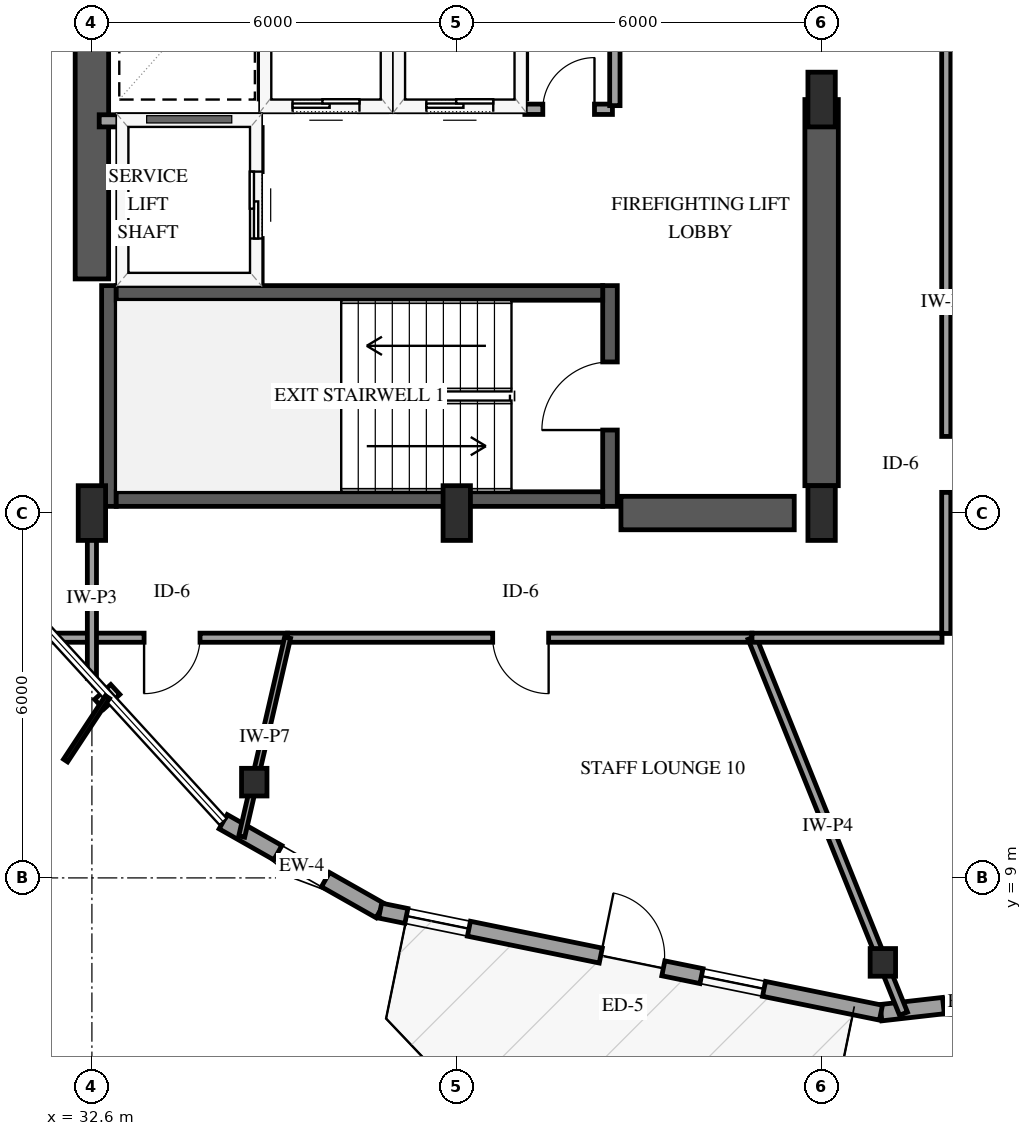
"""IFC4 building model, lengths in metres.
Left out: names, types, materials, properties, quantities, classifications, styles, units other than length and angle.
Written with IfcOpenShell. Run it as: python <this file> out.ifc"""

import sys

from ifc_helpers import new_model, si_unit, direction, frame, frame_2d, origin, origin_2d, place, context, subcontext, project, spatial, rectangle, i_section, extrude, element, fill, save


model = new_model("IFC4")
c1 = context("Model", 3, precision=1e-05, world=origin(), true_north=direction((0.0, 1.0)))
c2 = subcontext(c1, "Body", "Model", "MODEL_VIEW")
j1 = project(units=[si_unit("LENGTHUNIT", "METRE"), si_unit("PLANEANGLEUNIT", "RADIAN")], contexts=[c1])
p1 = place(None, origin())
s1 = spatial("IfcSite", under=j1, at=p1, CompositionType="ELEMENT")
p2 = place(p1, origin())
s2 = spatial("IfcBuilding", under=s1, at=p2, CompositionType="ELEMENT")
p3 = place(p2, frame((0.0, 0.0, 122.5)))
s3 = spatial("IfcBuildingStorey", under=s2, at=p3, CompositionType="ELEMENT", Elevation=122.5)
p4 = place(p3, frame((32.88, 15.11, 0.0), z_axis=(0.0, 0.0, 1.0), x_axis=(0.0, 1.0, 0.0)))
e1 = element("IfcWall", 1, at=p4, inside=s3, PredefinedType="SHEAR", context=c2, shape_type="SweptSolid", body=[
    extrude(rectangle(XDim=3.63, YDim=0.24, at=frame_2d((1.815, 0.0))), origin(), (0.0, 0.0, 1.0), 3.9),
])
p5 = place(p3, frame((41.12, 15.11, 0.0), z_axis=(0.0, 0.0, 1.0), x_axis=(0.0, 1.0, 0.0)))
e2 = element("IfcWall", 2, at=p5, inside=s3, PredefinedType="SHEAR", context=c2, shape_type="SweptSolid", body=[
    extrude(rectangle(XDim=3.63, YDim=0.24, at=frame_2d((1.815, 0.0))), origin(), (0.0, 0.0, 1.0), 3.9),
])
p6 = place(p5, frame((1.255, 0.0, 0.0)))
e3 = element("IfcOpeningElement", 3, at=p6, cuts=e2, PredefinedType="OPENING", context=c2, shape_type="SweptSolid", body=[
    extrude(rectangle(XDim=1.12, YDim=2.15, at=frame_2d((0.56, 1.075))), frame((0.0, 0.13, 0.0), z_axis=(0.0, -1.0, 0.0), x_axis=(1.0, 0.0, 0.0)), (0.0, 0.0, 1.0), 0.26),
])
for number, where, z_axis, x_axis in (
    (4, (33.0, 15.23, 0.0), (0.0, 0.0, 1.0), (1.0, 0.0, 0.0)),
    (5, (33.0, 18.62, 0.0), (0.0, 0.0, 1.0), (1.0, 0.0, 0.0)),
):
    element("IfcWall", number, at=place(p3, frame(where, z_axis=z_axis, x_axis=x_axis)), inside=s3, PredefinedType="SHEAR", context=c2, shape_type="SweptSolid", body=[
        extrude(rectangle(XDim=8.0, YDim=0.24, at=frame_2d((4.0, 0.0))), origin(), (0.0, 0.0, 1.0), 3.9),
    ])
p7 = place(p3, frame((32.6, 18.85, 0.0), z_axis=(0.0, 0.0, 1.0), x_axis=(0.0, 1.0, 0.0)))
e6 = element("IfcWall", 6, at=p7, inside=s3, PredefinedType="SHEAR", context=c2, shape_type="SweptSolid", body=[
    extrude(rectangle(XDim=12.3, YDim=0.55, at=frame_2d((6.15, 0.0))), origin(), (0.0, 0.0, 1.0), 3.9),
])
p8 = place(p3, frame((41.3, 15.0, 0.0), z_axis=(0.0, 0.0, 1.0), x_axis=(1.0, 0.0, 0.0)))
e7 = element("IfcWall", 7, at=p8, inside=s3, PredefinedType="SHEAR", context=c2, shape_type="SweptSolid", body=[
    extrude(rectangle(XDim=2.85, YDim=0.55, at=frame_2d((1.425, 0.0))), origin(), (0.0, 0.0, 1.0), 3.9),
])
p9 = place(p3, frame((44.6, 15.45, 0.0), z_axis=(0.0, 0.0, 1.0), x_axis=(0.0, 1.0, 0.0)))
e8 = element("IfcWall", 8, at=p9, inside=s3, PredefinedType="SHEAR", context=c2, shape_type="SweptSolid", body=[
    extrude(rectangle(XDim=6.35, YDim=0.55, at=frame_2d((3.175, 0.0))), origin(), (0.0, 0.0, 1.0), 3.9),
])
for number, where, z_axis, x_axis in (
    (9, (32.6, 15.0, 0.0), (0.0, 0.0, 1.0), (1.0, 0.0, 0.0)),
    (10, (38.6, 15.0, 0.0), (0.0, 0.0, 1.0), (1.0, 0.0, 0.0)),
    (11, (44.6, 15.0, 0.0), (0.0, 0.0, 1.0), (1.0, 0.0, 0.0)),
    (12, (44.6, 21.8, 0.0), (0.0, 0.0, 1.0), (1.0, 0.0, 0.0)),
):
    element("IfcColumn", number, at=place(p3, frame(where, z_axis=z_axis, x_axis=x_axis)), inside=s3, PredefinedType="PILASTER", context=c2, shape_type="SweptSolid", body=[
        extrude(rectangle(XDim=0.45, YDim=0.9, at=origin_2d()), origin(), (0.0, 0.0, 1.0), 3.9),
    ])
for number, where, z_axis, x_axis in (
    (13, (35.27, 10.575, 0.0), (0.0, 0.0, 1.0), (1.0, 0.0, 0.0)),
    (14, (45.607, 7.611, 0.0), (0.0, 0.0, 1.0), (1.0, 0.0, 0.0)),
):
    element("IfcColumn", number, at=place(p3, frame(where, z_axis=z_axis, x_axis=x_axis)), inside=s3, PredefinedType="COLUMN", context=c2, shape_type="SweptSolid", body=[
        extrude(i_section(OverallWidth=0.418, OverallDepth=0.455, WebThickness=0.042, FlangeThickness=0.068, FilletRadius=0.038, at=origin_2d()), origin(), (0.0, 0.0, 1.0), 3.9),
    ])
p10 = place(p3, frame((34.759, 9.924, 0.0), z_axis=(0.0, 0.0, 1.0), x_axis=(0.870196274844, -0.492705229572, 0.0)))
e15 = element("IfcWall", 15, at=p10, inside=s3, PredefinedType="SOLIDWALL", context=c2, shape_type="SweptSolid", body=[
    extrude(rectangle(XDim=2.967, YDim=0.27, at=frame_2d((1.483, 0.0))), origin(), (0.0, 0.0, 1.0), 2.979),
])
p11 = place(p10, frame((1.033, 0.0, 0.75)))
e16 = element("IfcOpeningElement", 16, at=p11, cuts=e15, PredefinedType="OPENING", context=c2, shape_type="SweptSolid", body=[
    extrude(rectangle(XDim=0.9, YDim=1.5, at=frame_2d((0.45, 0.75))), frame((0.0, 0.145, 0.0), z_axis=(0.0, -1.0, 0.0), x_axis=(1.0, 0.0, 0.0)), (0.0, 0.0, 1.0), 0.29),
])
p12 = place(p3, frame((45.576, 6.783, 0.0), z_axis=(0.0, 0.0, 1.0), x_axis=(0.993605674431, 0.11290599514, 0.0)))
e17 = element("IfcWall", 17, at=p12, inside=s3, PredefinedType="SOLIDWALL", context=c2, shape_type="SweptSolid", body=[
    extrude(rectangle(XDim=2.967, YDim=0.27, at=frame_2d((1.483, 0.0))), origin(), (0.0, 0.0, 1.0), 2.979),
])
p13 = place(p12, frame((1.033, 0.0, 0.75)))
e18 = element("IfcOpeningElement", 18, at=p13, cuts=e17, PredefinedType="OPENING", context=c2, shape_type="SweptSolid", body=[
    extrude(rectangle(XDim=0.9, YDim=1.5, at=frame_2d((0.45, 0.75))), frame((0.0, 0.145, 0.0), z_axis=(0.0, -1.0, 0.0), x_axis=(1.0, 0.0, 0.0)), (0.0, 0.0, 1.0), 0.29),
])
p14 = place(p3, frame((37.34, 8.462, 0.0), z_axis=(0.0, 0.0, 1.0), x_axis=(0.979852344118, -0.199723267865, 0.0)))
e19 = element("IfcWall", 19, at=p14, inside=s3, PredefinedType="SOLIDWALL", context=c2, shape_type="SweptSolid", body=[
    extrude(rectangle(XDim=8.405, YDim=0.25, at=frame_2d((4.203, 0.0))), origin(), (0.0, 0.0, 1.0), 2.979),
])
p15 = place(p14, frame((3.703, 0.0, 0.0)))
e20 = element("IfcOpeningElement", 20, at=p15, cuts=e19, PredefinedType="OPENING", context=c2, shape_type="SweptSolid", body=[
    extrude(rectangle(XDim=1.05, YDim=2.15, at=frame_2d((0.525, 1.075))), frame((0.0, 0.135, 0.0), z_axis=(0.0, -1.0, 0.0), x_axis=(1.0, 0.0, 0.0)), (0.0, 0.0, 1.0), 0.27),
])
p16 = place(p14, frame((0.44, 0.0, 0.72)))
e21 = element("IfcOpeningElement", 21, at=p16, cuts=e19, PredefinedType="OPENING", context=c2, shape_type="SweptSolid", body=[
    extrude(rectangle(XDim=1.05, YDim=1.55, at=frame_2d((0.525, 0.775))), frame((0.0, 0.135, 0.0), z_axis=(0.0, -1.0, 0.0), x_axis=(1.0, 0.0, 0.0)), (0.0, 0.0, 1.0), 0.27),
])
p17 = place(p14, frame((5.393, 0.0, 0.72)))
e22 = element("IfcOpeningElement", 22, at=p17, cuts=e19, PredefinedType="OPENING", context=c2, shape_type="SweptSolid", body=[
    extrude(rectangle(XDim=1.05, YDim=1.55, at=frame_2d((0.525, 0.775))), frame((0.0, 0.135, 0.0), z_axis=(0.0, -1.0, 0.0), x_axis=(1.0, 0.0, 0.0)), (0.0, 0.0, 1.0), 0.27),
])
p18 = place(p3, frame((35.45, 21.7, 0.0), z_axis=(0.0, 0.0, 1.0), x_axis=(1.0, 0.0, 0.0)))
e23 = element("IfcWall", 23, at=p18, inside=s3, PredefinedType="SOLIDWALL", context=c2, shape_type="SweptSolid", body=[
    extrude(rectangle(XDim=2.0, YDim=0.2, at=frame_2d((1.0, 0.0))), origin(), (0.0, 0.0, 1.0), 3.6),
])
p19 = place(p18, frame((0.45, 0.0, 0.0)))
e24 = element("IfcOpeningElement", 24, at=p19, cuts=e23, PredefinedType="OPENING", context=c2, shape_type="SweptSolid", body=[
    extrude(rectangle(XDim=1.1, YDim=2.15, at=frame_2d((0.55, 1.075))), frame((0.0, 0.11, 0.0), z_axis=(0.0, -1.0, 0.0), x_axis=(1.0, 0.0, 0.0)), (0.0, 0.0, 1.0), 0.22),
])
for number, where, z_axis, x_axis in (
    (25, (35.45, 21.81, 0.0), (0.0, 0.0, 1.0), (0.0, 1.0, 0.0)),
    (26, (37.45, 21.81, 0.0), (0.0, 0.0, 1.0), (0.0, 1.0, 0.0)),
):
    element("IfcWall", number, at=place(p3, frame(where, z_axis=z_axis, x_axis=x_axis)), inside=s3, PredefinedType="SOLIDWALL", context=c2, shape_type="SweptSolid", body=[
        extrude(rectangle(XDim=2.38, YDim=0.2, at=frame_2d((1.19, 0.0))), origin(), (0.0, 0.0, 1.0), 3.6),
    ])
p20 = place(p3, frame((37.65, 21.7, 0.0), z_axis=(0.0, 0.0, 1.0), x_axis=(1.0, 0.0, 0.0)))
e27 = element("IfcWall", 27, at=p20, inside=s3, PredefinedType="SOLIDWALL", context=c2, shape_type="SweptSolid", body=[
    extrude(rectangle(XDim=2.0, YDim=0.2, at=frame_2d((1.0, 0.0))), origin(), (0.0, 0.0, 1.0), 3.6),
])
p21 = place(p20, frame((0.45, 0.0, 0.0)))
e28 = element("IfcOpeningElement", 28, at=p21, cuts=e27, PredefinedType="OPENING", context=c2, shape_type="SweptSolid", body=[
    extrude(rectangle(XDim=1.1, YDim=2.15, at=frame_2d((0.55, 1.075))), frame((0.0, 0.11, 0.0), z_axis=(0.0, -1.0, 0.0), x_axis=(1.0, 0.0, 0.0)), (0.0, 0.0, 1.0), 0.22),
])
p22 = place(p3, frame((39.65, 21.81, 0.0), z_axis=(0.0, 0.0, 1.0), x_axis=(0.0, 1.0, 0.0)))
e29 = element("IfcWall", 29, at=p22, inside=s3, PredefinedType="SOLIDWALL", context=c2, shape_type="SweptSolid", body=[
    extrude(rectangle(XDim=2.38, YDim=0.2, at=frame_2d((1.19, 0.0))), origin(), (0.0, 0.0, 1.0), 3.6),
])
p23 = place(p3, frame((32.72, 21.45, 0.0), z_axis=(0.0, 0.0, 1.0), x_axis=(1.0, 0.0, 0.0)))
e30 = element("IfcWall", 30, at=p23, inside=s3, PredefinedType="SOLIDWALL", context=c2, shape_type="SweptSolid", body=[
    extrude(rectangle(XDim=2.58, YDim=0.2, at=frame_2d((1.29, 0.0))), origin(), (0.0, 0.0, 1.0), 3.6),
])
p24 = place(p3, frame((35.3, 18.79, 0.0), z_axis=(0.0, 0.0, 1.0), x_axis=(0.0, 1.0, 0.0)))
e31 = element("IfcWall", 31, at=p24, inside=s3, PredefinedType="SOLIDWALL", context=c2, shape_type="SweptSolid", body=[
    extrude(rectangle(XDim=2.55, YDim=0.2, at=frame_2d((1.275, 0.0))), origin(), (0.0, 0.0, 1.0), 3.6),
])
p25 = place(p24, frame((0.725, 0.0, 0.0)))
e32 = element("IfcOpeningElement", 32, at=p25, cuts=e31, PredefinedType="OPENING", context=c2, shape_type="SweptSolid", body=[
    extrude(rectangle(XDim=1.1, YDim=2.15, at=frame_2d((0.55, 1.075))), frame((0.0, 0.11, 0.0), z_axis=(0.0, -1.0, 0.0), x_axis=(1.0, 0.0, 0.0)), (0.0, 0.0, 1.0), 0.22),
])
p26 = place(p3, frame((46.65, 18.55, 0.0), z_axis=(0.0, 0.0, 1.0), x_axis=(0.780401084776, -0.625279255118, 0.0)))
e33 = element("IfcWall", 33, at=p26, inside=s3, PredefinedType="PARTITIONING", context=c2, shape_type="SweptSolid", body=[
    extrude(rectangle(XDim=12.482, YDim=0.13, at=frame_2d((6.241, 0.0))), origin(), (0.0, 0.0, 1.0), 3.6),
])
p27 = place(p3, frame((43.455, 12.95, 0.0), z_axis=(0.0, 0.0, 1.0), x_axis=(-1.0, 0.0, 0.0)))
e34 = element("IfcWall", 34, at=p27, inside=s3, PredefinedType="PARTITIONING", context=c2, shape_type="SweptSolid", body=[
    extrude(rectangle(XDim=7.637, YDim=0.15, at=frame_2d((3.818, 0.0))), origin(), (0.0, 0.0, 1.0), 3.6),
])
p28 = place(p27, frame((3.344, 0.0, 0.0)))
e35 = element("IfcOpeningElement", 35, at=p28, cuts=e34, PredefinedType="OPENING", context=c2, shape_type="SweptSolid", body=[
    extrude(rectangle(XDim=0.92, YDim=2.12, at=frame_2d((0.46, 1.06))), frame((0.0, 0.085, 0.0), z_axis=(0.0, -1.0, 0.0), x_axis=(1.0, 0.0, 0.0)), (0.0, 0.0, 1.0), 0.17),
])
p29 = place(p3, frame((43.455, 12.95, 0.0), z_axis=(0.0, 0.0, 1.0), x_axis=(0.373820474629, -0.927501079648, 0.0)))
e36 = element("IfcWall", 36, at=p29, inside=s3, PredefinedType="PARTITIONING", context=c2, shape_type="SweptSolid", body=[
    extrude(rectangle(XDim=6.666, YDim=0.14, at=frame_2d((3.333, 0.0))), origin(), (0.0, 0.0, 1.0), 2.895),
])
p30 = place(p3, frame((46.65, 18.55, 0.0), z_axis=(0.0, 0.0, 1.0), x_axis=(0.0, -1.0, 0.0)))
e37 = element("IfcWall", 37, at=p30, inside=s3, PredefinedType="PARTITIONING", context=c2, shape_type="SweptSolid", body=[
    extrude(rectangle(XDim=5.53, YDim=0.15, at=frame_2d((2.765, 0.0))), origin(), (0.0, 0.0, 1.0), 3.6),
])
p31 = place(p30, frame((2.29, 0.0, 0.0)))
e38 = element("IfcOpeningElement", 38, at=p31, cuts=e37, PredefinedType="OPENING", context=c2, shape_type="SweptSolid", body=[
    extrude(rectangle(XDim=0.92, YDim=2.12, at=frame_2d((0.46, 1.06))), frame((0.0, 0.085, 0.0), z_axis=(0.0, -1.0, 0.0), x_axis=(1.0, 0.0, 0.0)), (0.0, 0.0, 1.0), 0.17),
])
p32 = place(p3, frame((46.65, 23.93, 0.0), z_axis=(0.0, 0.0, 1.0), x_axis=(0.0, -1.0, 0.0)))
e39 = element("IfcWall", 39, at=p32, inside=s3, PredefinedType="PARTITIONING", context=c2, shape_type="SweptSolid", body=[
    extrude(rectangle(XDim=5.38, YDim=0.15, at=frame_2d((2.69, 0.0))), origin(), (0.0, 0.0, 1.0), 3.6),
])
p33 = place(p3, frame((35.818, 12.95, 0.0), z_axis=(0.0, 0.0, 1.0), x_axis=(-1.0, 0.0, 0.0)))
e40 = element("IfcWall", 40, at=p33, inside=s3, PredefinedType="PARTITIONING", context=c2, shape_type="SweptSolid", body=[
    extrude(rectangle(XDim=3.83, YDim=0.15, at=frame_2d((1.915, 0.0))), origin(), (0.0, 0.0, 1.0), 3.6),
])
p34 = place(p33, frame((1.44, 0.0, 0.0)))
e41 = element("IfcOpeningElement", 41, at=p34, cuts=e40, PredefinedType="OPENING", context=c2, shape_type="SweptSolid", body=[
    extrude(rectangle(XDim=0.92, YDim=2.12, at=frame_2d((0.46, 1.06))), frame((0.0, 0.085, 0.0), z_axis=(0.0, -1.0, 0.0), x_axis=(1.0, 0.0, 0.0)), (0.0, 0.0, 1.0), 0.17),
])
p35 = place(p3, frame((35.818, 12.95, 0.0), z_axis=(0.0, 0.0, 1.0), x_axis=(-0.224790414322, -0.974407137509, 0.0)))
e42 = element("IfcWall", 42, at=p35, inside=s3, PredefinedType="PARTITIONING", context=c2, shape_type="SweptSolid", body=[
    extrude(rectangle(XDim=3.355, YDim=0.1, at=frame_2d((1.677, 0.0))), origin(), (0.0, 0.0, 1.0), 2.895),
])
p36 = place(p3, frame((46.58, 12.95, 0.0), z_axis=(0.0, 0.0, 1.0), x_axis=(-1.0, 0.0, 0.0)))
e43 = element("IfcWall", 43, at=p36, inside=s3, PredefinedType="PARTITIONING", context=c2, shape_type="SweptSolid", body=[
    extrude(rectangle(XDim=3.125, YDim=0.15, at=frame_2d((1.562, 0.0))), origin(), (0.0, 0.0, 1.0), 3.6),
])
p37 = place(p3, frame((32.6, 12.281, 0.0), z_axis=(0.0, 0.0, 1.0), x_axis=(0.0, 1.0, 0.0)))
e44 = element("IfcWall", 44, at=p37, inside=s3, PredefinedType="PARTITIONING", context=c2, shape_type="SweptSolid", body=[
    extrude(rectangle(XDim=2.649, YDim=0.15, at=frame_2d((1.324, 0.0))), origin(), (0.0, 0.0, 1.0), 3.6),
])
p38 = place(p3, frame((39.72, 21.64, 0.0), z_axis=(0.0, 0.0, 1.0), x_axis=(1.0, 0.0, 0.0)))
e45 = element("IfcWall", 45, at=p38, inside=s3, PredefinedType="PARTITIONING", context=c2, shape_type="SweptSolid", body=[
    extrude(rectangle(XDim=1.44, YDim=0.17, at=frame_2d((0.72, 0.0))), origin(), (0.0, 0.0, 1.0), 3.6),
])
p39 = place(p38, frame((0.295, 0.0, 0.0)))
e46 = element("IfcOpeningElement", 46, at=p39, cuts=e45, PredefinedType="OPENING", context=c2, shape_type="SweptSolid", body=[
    extrude(rectangle(XDim=0.85, YDim=2.1, at=frame_2d((0.425, 1.05))), frame((0.0, 0.095, 0.0), z_axis=(0.0, -1.0, 0.0), x_axis=(1.0, 0.0, 0.0)), (0.0, 0.0, 1.0), 0.19),
])
p40 = place(p3, frame((41.2, 21.7, 0.0), z_axis=(0.0, 0.0, 1.0), x_axis=(0.0, 1.0, 0.0)))
e47 = element("IfcWall", 47, at=p40, inside=s3, PredefinedType="PARTITIONING", context=c2, shape_type="SweptSolid", body=[
    extrude(rectangle(XDim=1.12, YDim=0.17, at=frame_2d((0.56, 0.0))), origin(), (0.0, 0.0, 1.0), 3.6),
])
p41 = place(p11, origin())
e48 = element("IfcWindow", 48, at=p41, inside=s3, PartitioningType="SINGLE_PANEL", PredefinedType="WINDOW", context=c2, shape_type="SweptSolid", body=[
    extrude(rectangle(XDim=0.9, YDim=1.5, at=frame_2d((0.45, 0.75))), frame((0.0, 0.03, 0.0), z_axis=(0.0, -1.0, 0.0), x_axis=(1.0, 0.0, 0.0)), (0.0, 0.0, 1.0), 0.06),
])
fill(e16, e48)
p42 = place(p13, origin())
e49 = element("IfcWindow", 49, at=p42, inside=s3, PartitioningType="SINGLE_PANEL", PredefinedType="WINDOW", context=c2, shape_type="SweptSolid", body=[
    extrude(rectangle(XDim=0.9, YDim=1.5, at=frame_2d((0.45, 0.75))), frame((0.0, 0.03, 0.0), z_axis=(0.0, -1.0, 0.0), x_axis=(1.0, 0.0, 0.0)), (0.0, 0.0, 1.0), 0.06),
])
fill(e18, e49)
p43 = place(p15, origin())
e50 = element("IfcDoor", 50, at=p43, inside=s3, OperationType="SINGLE_SWING_LEFT", PredefinedType="DOOR", context=c2, shape_type="SweptSolid", body=[
    extrude(rectangle(XDim=1.05, YDim=2.15, at=frame_2d((0.525, 1.075))), frame((0.0, 0.025, 0.0), z_axis=(0.0, -1.0, 0.0), x_axis=(1.0, 0.0, 0.0)), (0.0, 0.0, 1.0), 0.05),
])
fill(e20, e50)
p44 = place(p16, origin())
e51 = element("IfcWindow", 51, at=p44, inside=s3, PartitioningType="SINGLE_PANEL", PredefinedType="WINDOW", context=c2, shape_type="SweptSolid", body=[
    extrude(rectangle(XDim=1.05, YDim=1.55, at=frame_2d((0.525, 0.775))), frame((0.0, 0.03, 0.0), z_axis=(0.0, -1.0, 0.0), x_axis=(1.0, 0.0, 0.0)), (0.0, 0.0, 1.0), 0.06),
])
fill(e21, e51)
p45 = place(p17, origin())
e52 = element("IfcWindow", 52, at=p45, inside=s3, PartitioningType="SINGLE_PANEL", PredefinedType="WINDOW", context=c2, shape_type="SweptSolid", body=[
    extrude(rectangle(XDim=1.05, YDim=1.55, at=frame_2d((0.525, 0.775))), frame((0.0, 0.03, 0.0), z_axis=(0.0, -1.0, 0.0), x_axis=(1.0, 0.0, 0.0)), (0.0, 0.0, 1.0), 0.06),
])
fill(e22, e52)
p46 = place(p19, origin())
e53 = element("IfcDoor", 53, at=p46, inside=s3, OperationType="SLIDING_TO_LEFT", PredefinedType="DOOR", context=c2, shape_type="SweptSolid", body=[
    extrude(rectangle(XDim=1.1, YDim=2.15, at=frame_2d((0.55, 1.075))), frame((0.0, 0.025, 0.0), z_axis=(0.0, -1.0, 0.0), x_axis=(1.0, 0.0, 0.0)), (0.0, 0.0, 1.0), 0.05),
])
fill(e24, e53)
p47 = place(p21, origin())
e54 = element("IfcDoor", 54, at=p47, inside=s3, OperationType="SLIDING_TO_LEFT", PredefinedType="DOOR", context=c2, shape_type="SweptSolid", body=[
    extrude(rectangle(XDim=1.1, YDim=2.15, at=frame_2d((0.55, 1.075))), frame((0.0, 0.025, 0.0), z_axis=(0.0, -1.0, 0.0), x_axis=(1.0, 0.0, 0.0)), (0.0, 0.0, 1.0), 0.05),
])
fill(e28, e54)
p48 = place(p25, origin())
e55 = element("IfcDoor", 55, at=p48, inside=s3, OperationType="SLIDING_TO_LEFT", PredefinedType="DOOR", context=c2, shape_type="SweptSolid", body=[
    extrude(rectangle(XDim=1.1, YDim=2.15, at=frame_2d((0.55, 1.075))), frame((0.0, 0.025, 0.0), z_axis=(0.0, -1.0, 0.0), x_axis=(1.0, 0.0, 0.0)), (0.0, 0.0, 1.0), 0.05),
])
fill(e32, e55)
p49 = place(p6, origin())
e56 = element("IfcDoor", 56, at=p49, inside=s3, OperationType="SINGLE_SWING_LEFT", PredefinedType="DOOR", context=c2, shape_type="SweptSolid", body=[
    extrude(rectangle(XDim=1.12, YDim=2.15, at=frame_2d((0.56, 1.075))), frame((0.0, 0.025, 0.0), z_axis=(0.0, -1.0, 0.0), x_axis=(1.0, 0.0, 0.0)), (0.0, 0.0, 1.0), 0.05),
])
fill(e3, e56)
p50 = place(p28, origin())
e57 = element("IfcDoor", 57, at=p50, inside=s3, OperationType="SINGLE_SWING_LEFT", PredefinedType="DOOR", context=c2, shape_type="SweptSolid", body=[
    extrude(rectangle(XDim=0.92, YDim=2.12, at=frame_2d((0.46, 1.06))), frame((0.0, 0.025, 0.0), z_axis=(0.0, -1.0, 0.0), x_axis=(1.0, 0.0, 0.0)), (0.0, 0.0, 1.0), 0.05),
])
fill(e35, e57)
p51 = place(p31, origin())
e58 = element("IfcDoor", 58, at=p51, inside=s3, OperationType="SINGLE_SWING_LEFT", PredefinedType="DOOR", context=c2, shape_type="SweptSolid", body=[
    extrude(rectangle(XDim=0.92, YDim=2.12, at=frame_2d((0.46, 1.06))), frame((0.0, 0.025, 0.0), z_axis=(0.0, -1.0, 0.0), x_axis=(1.0, 0.0, 0.0)), (0.0, 0.0, 1.0), 0.05),
])
fill(e38, e58)
p52 = place(p34, origin())
e59 = element("IfcDoor", 59, at=p52, inside=s3, OperationType="SINGLE_SWING_RIGHT", PredefinedType="DOOR", context=c2, shape_type="SweptSolid", body=[
    extrude(rectangle(XDim=0.92, YDim=2.12, at=frame_2d((0.46, 1.06))), frame((0.0, 0.025, 0.0), z_axis=(0.0, -1.0, 0.0), x_axis=(1.0, 0.0, 0.0)), (0.0, 0.0, 1.0), 0.05),
])
fill(e41, e59)
p53 = place(p39, origin())
e60 = element("IfcDoor", 60, at=p53, inside=s3, OperationType="SINGLE_SWING_RIGHT", PredefinedType="DOOR", context=c2, shape_type="SweptSolid", body=[
    extrude(rectangle(XDim=0.85, YDim=2.1, at=frame_2d((0.425, 1.05))), frame((0.0, 0.025, 0.0), z_axis=(0.0, -1.0, 0.0), x_axis=(1.0, 0.0, 0.0)), (0.0, 0.0, 1.0), 0.05),
])
fill(e46, e60)
save(model, sys.argv[1])
